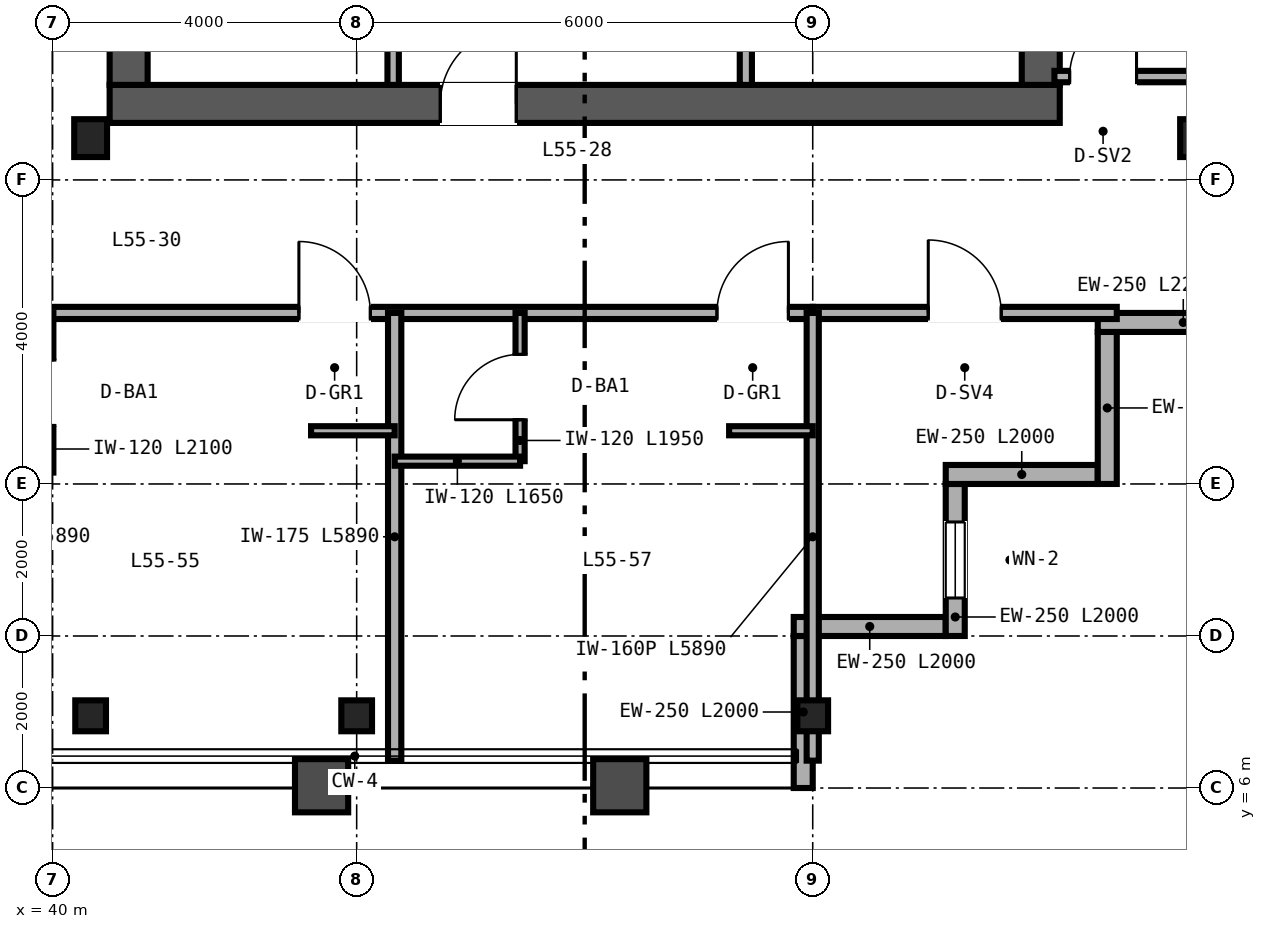
"""IFC4 building model, lengths in metres.
Left out: names, types, materials, properties, quantities, classifications, styles, units other than length and angle.
Written with IfcOpenShell. Run it as: python <this file> out.ifc"""

import sys

from ifc_helpers import new_model, si_unit, direction, frame, frame_2d, origin, origin_2d, place, context, subcontext, project, spatial, rectangle, i_section, extrude, source, transform, mapped, element, fill, save


model = new_model("IFC4")
c1 = context("Model", 3, precision=1e-05, world=origin(), true_north=direction((0.0, 1.0)))
c2 = subcontext(c1, "Body", "Model", "MODEL_VIEW")
j1 = project(units=[si_unit("LENGTHUNIT", "METRE"), si_unit("PLANEANGLEUNIT", "RADIAN")], contexts=[c1])
p1 = place(None, origin())
s1 = spatial("IfcSite", under=j1, at=p1, CompositionType="ELEMENT")
p2 = place(p1, origin())
s2 = spatial("IfcBuilding", under=s1, at=p2, CompositionType="ELEMENT")
p3 = place(p2, frame((0.0, 0.0, 217.2)))
s3 = spatial("IfcBuildingStorey", under=s2, at=p3, CompositionType="ELEMENT", Elevation=217.2)
p4 = place(p3, frame((40.75, 15.0, 0.0), z_axis=(0.0, 0.0, 1.0), x_axis=(1.0, 0.0, 0.0)))
e1 = element("IfcWall", 1, at=p4, inside=s3, PredefinedType="SHEAR", context=c2, shape_type="SweptSolid", body=[
    extrude(rectangle(XDim=12.5, YDim=0.5, at=frame_2d((6.25, 0.0))), origin(), (0.0, 0.0, 1.0), 3.28),
])
p5 = place(p4, frame((4.35, 0.0, 0.0)))
e2 = element("IfcOpeningElement", 2, at=p5, cuts=e1, PredefinedType="OPENING", context=c2, shape_type="SweptSolid", body=[
    extrude(rectangle(XDim=1.0, YDim=2.15, at=frame_2d((0.5, 1.075))), frame((0.0, 0.26, 0.0), z_axis=(0.0, -1.0, 0.0), x_axis=(1.0, 0.0, 0.0)), (0.0, 0.0, 1.0), 0.52),
])
for number, where, z_axis, x_axis in (
    (3, (41.0, 15.25, 0.0), (0.0, 0.0, 1.0), (0.0, 1.0, 0.0)),
    (4, (53.0, 15.25, 0.0), (0.0, 0.0, 1.0), (0.0, 1.0, 0.0)),
):
    element("IfcWall", number, at=place(p3, frame(where, z_axis=z_axis, x_axis=x_axis)), inside=s3, PredefinedType="SHEAR", context=c2, shape_type="SweptSolid", body=[
        extrude(rectangle(XDim=21.5, YDim=0.5, at=frame_2d((10.75, 0.0))), origin(), (0.0, 0.0, 1.0), 3.28),
    ])
m1 = source(origin(), c2, "Body", "SweptSolid", [
    extrude(i_section(OverallWidth=0.432, OverallDepth=0.498, WebThickness=0.056, FlangeThickness=0.089, FilletRadius=0.025, at=origin_2d()), origin(), (0.0, 0.0, 1.0), 3.28),
])
for number, where, z_axis, x_axis in (
    (5, (40.5, 14.55, 0.0), (0.0, 0.0, 1.0), (1.0, 0.0, 0.0)),
    (6, (55.05, 14.55, 0.0), (0.0, 0.0, 1.0), (1.0, 0.0, 0.0)),
):
    element("IfcColumn", number, at=place(p3, frame(where, z_axis=z_axis, x_axis=x_axis)), inside=s3, PredefinedType="COLUMN", context=c2, shape_type="MappedRepresentation", body=[
        mapped(m1, transform((0.0, 0.0, 0.0), scale=1.0)),
    ])
m2 = source(origin(), c2, "Body", "SweptSolid", [
    extrude(i_section(OverallWidth=0.404, OverallDepth=0.407, WebThickness=0.027, FlangeThickness=0.044, FilletRadius=0.025, at=origin_2d()), origin(), (0.0, 0.0, 1.0), 3.28),
])
for number, where, z_axis, x_axis in (
    (7, (40.5, 6.95, 0.0), (0.0, 0.0, 1.0), (1.0, 0.0, 0.0)),
    (8, (44.0, 6.95, 0.0), (0.0, 0.0, 1.0), (1.0, 0.0, 0.0)),
    (9, (50.0, 6.95, 0.0), (0.0, 0.0, 1.0), (1.0, 0.0, 0.0)),
):
    element("IfcColumn", number, at=place(p3, frame(where, z_axis=z_axis, x_axis=x_axis)), inside=s3, PredefinedType="COLUMN", context=c2, shape_type="MappedRepresentation", body=[
        mapped(m2, transform((0.0, 0.0, 0.0), scale=1.0)),
    ])
p6 = place(p3, frame((49.875, 6.0, 0.0), z_axis=(0.0, 0.0, 1.0), x_axis=(0.0, 1.0, 0.0)))
e10 = element("IfcWall", 10, at=p6, inside=s3, PredefinedType="SOLIDWALL", context=c2, shape_type="SweptSolid", body=[
    extrude(rectangle(XDim=2.0, YDim=0.25, at=frame_2d((1.0, 0.0))), origin(), (0.0, 0.0, 1.0), 2.587),
])
p7 = place(p3, frame((49.75, 8.125, 0.0), z_axis=(0.0, 0.0, 1.0), x_axis=(1.0, 0.0, 0.0)))
e11 = element("IfcWall", 11, at=p7, inside=s3, PredefinedType="SOLIDWALL", context=c2, shape_type="SweptSolid", body=[
    extrude(rectangle(XDim=2.0, YDim=0.25, at=frame_2d((1.0, 0.0))), origin(), (0.0, 0.0, 1.0), 3.28),
])
p8 = place(p3, frame((51.875, 8.0, 0.0), z_axis=(0.0, 0.0, 1.0), x_axis=(0.0, 1.0, 0.0)))
e12 = element("IfcWall", 12, at=p8, inside=s3, PredefinedType="SOLIDWALL", context=c2, shape_type="SweptSolid", body=[
    extrude(rectangle(XDim=2.0, YDim=0.25, at=frame_2d((1.0, 0.0))), origin(), (0.0, 0.0, 1.0), 3.28),
])
p9 = place(p8, frame((0.5, 0.0, 0.85)))
e13 = element("IfcOpeningElement", 13, at=p9, cuts=e12, PredefinedType="OPENING", context=c2, shape_type="SweptSolid", body=[
    extrude(rectangle(XDim=1.0, YDim=1.9, at=frame_2d((0.5, 0.95))), frame((0.0, 0.135, 0.0), z_axis=(0.0, -1.0, 0.0), x_axis=(1.0, 0.0, 0.0)), (0.0, 0.0, 1.0), 0.27),
])
for number, where, z_axis, x_axis in (
    (14, (51.75, 10.125, 0.0), (0.0, 0.0, 1.0), (1.0, 0.0, 0.0)),
    (15, (53.875, 10.0, 0.0), (0.0, 0.0, 1.0), (0.0, 1.0, 0.0)),
):
    element("IfcWall", number, at=place(p3, frame(where, z_axis=z_axis, x_axis=x_axis)), inside=s3, PredefinedType="SOLIDWALL", context=c2, shape_type="SweptSolid", body=[
        extrude(rectangle(XDim=2.0, YDim=0.25, at=frame_2d((1.0, 0.0))), origin(), (0.0, 0.0, 1.0), 3.28),
    ])
p10 = place(p3, frame((53.75, 12.125, 0.0), z_axis=(0.0, 0.0, 1.0), x_axis=(1.0, 0.0, 0.0)))
e16 = element("IfcWall", 16, at=p10, inside=s3, PredefinedType="SOLIDWALL", context=c2, shape_type="SweptSolid", body=[
    extrude(rectangle(XDim=2.25, YDim=0.25, at=frame_2d((1.125, 0.0))), origin(), (0.0, 0.0, 1.0), 3.28),
])
p11 = place(p3, frame((49.12, 15.25, 0.0), z_axis=(0.0, 0.0, 1.0), x_axis=(0.0, 1.0, 0.0)))
e17 = element("IfcWall", 17, at=p11, inside=s3, PredefinedType="PARTITIONING", context=c2, shape_type="SweptSolid", body=[
    extrude(rectangle(XDim=16.13, YDim=0.16, at=frame_2d((8.065, 0.0))), origin(), (0.0, 0.0, 1.0), 2.36),
])
p12 = place(p11, frame((3.8, 0.0, 0.0)))
e18 = element("IfcOpeningElement", 18, at=p12, cuts=e17, PredefinedType="OPENING", context=c2, shape_type="SweptSolid", body=[
    extrude(rectangle(XDim=0.92, YDim=2.15, at=frame_2d((0.46, 1.075))), frame((0.0, 0.09, 0.0), z_axis=(0.0, -1.0, 0.0), x_axis=(1.0, 0.0, 0.0)), (0.0, 0.0, 1.0), 0.18),
])
p13 = place(p11, frame((11.8, 0.0, 0.0)))
e19 = element("IfcOpeningElement", 19, at=p13, cuts=e17, PredefinedType="OPENING", context=c2, shape_type="SweptSolid", body=[
    extrude(rectangle(XDim=0.9, YDim=2.15, at=frame_2d((0.45, 1.075))), frame((0.0, 0.09, 0.0), z_axis=(0.0, -1.0, 0.0), x_axis=(1.0, 0.0, 0.0)), (0.0, 0.0, 1.0), 0.18),
])
p14 = place(p3, frame((44.48, 15.25, 0.0), z_axis=(0.0, 0.0, 1.0), x_axis=(0.0, 1.0, 0.0)))
e20 = element("IfcWall", 20, at=p14, inside=s3, PredefinedType="PARTITIONING", context=c2, shape_type="SweptSolid", body=[
    extrude(rectangle(XDim=11.63, YDim=0.15, at=frame_2d((5.815, 0.0))), origin(), (0.0, 0.0, 1.0), 3.28),
])
p15 = place(p14, frame((1.6, 0.0, 0.0)))
e21 = element("IfcOpeningElement", 21, at=p15, cuts=e20, PredefinedType="OPENING", context=c2, shape_type="SweptSolid", body=[
    extrude(rectangle(XDim=0.84, YDim=2.1, at=frame_2d((0.42, 1.05))), frame((0.0, 0.085, 0.0), z_axis=(0.0, -1.0, 0.0), x_axis=(1.0, 0.0, 0.0)), (0.0, 0.0, 1.0), 0.17),
])
p16 = place(p14, frame((5.85, 0.0, 0.0)))
e22 = element("IfcOpeningElement", 22, at=p16, cuts=e20, PredefinedType="OPENING", context=c2, shape_type="SweptSolid", body=[
    extrude(rectangle(XDim=0.84, YDim=2.1, at=frame_2d((0.42, 1.05))), frame((0.0, 0.085, 0.0), z_axis=(0.0, -1.0, 0.0), x_axis=(1.0, 0.0, 0.0)), (0.0, 0.0, 1.0), 0.17),
])
p17 = place(p14, frame((10.05, 0.0, 0.0)))
e23 = element("IfcOpeningElement", 23, at=p17, cuts=e20, PredefinedType="OPENING", context=c2, shape_type="SweptSolid", body=[
    extrude(rectangle(XDim=0.84, YDim=2.1, at=frame_2d((0.42, 1.05))), frame((0.0, 0.085, 0.0), z_axis=(0.0, -1.0, 0.0), x_axis=(1.0, 0.0, 0.0)), (0.0, 0.0, 1.0), 0.17),
])
p18 = place(p3, frame((53.18, 15.36, 0.0), z_axis=(0.0, 0.0, 1.0), x_axis=(1.0, 0.0, 0.0)))
e24 = element("IfcWall", 24, at=p18, inside=s3, PredefinedType="PARTITIONING", context=c2, shape_type="SweptSolid", body=[
    extrude(rectangle(XDim=2.66, YDim=0.15, at=frame_2d((1.33, 0.0))), origin(), (0.0, 0.0, 1.0), 2.501),
])
p19 = place(p18, frame((0.2, 0.0, 0.0)))
e25 = element("IfcOpeningElement", 25, at=p19, cuts=e24, PredefinedType="OPENING", context=c2, shape_type="SweptSolid", body=[
    extrude(rectangle(XDim=0.88, YDim=2.15, at=frame_2d((0.44, 1.075))), frame((0.0, 0.085, 0.0), z_axis=(0.0, -1.0, 0.0), x_axis=(1.0, 0.0, 0.0)), (0.0, 0.0, 1.0), 0.17),
])
p20 = place(p3, frame((50.0, 12.25, 0.0), z_axis=(0.0, 0.0, 1.0), x_axis=(1.0, 0.0, 0.0)))
e26 = element("IfcWall", 26, at=p20, inside=s3, PredefinedType="PARTITIONING", context=c2, shape_type="SweptSolid", body=[
    extrude(rectangle(XDim=4.0, YDim=0.16, at=frame_2d((2.0, 0.0))), origin(), (0.0, 0.0, 1.0), 3.28),
])
p21 = place(p20, frame((1.52, 0.0, 0.0)))
e27 = element("IfcOpeningElement", 27, at=p21, cuts=e26, PredefinedType="OPENING", context=c2, shape_type="SweptSolid", body=[
    extrude(rectangle(XDim=0.96, YDim=2.15, at=frame_2d((0.48, 1.075))), frame((0.0, 0.09, 0.0), z_axis=(0.0, -1.0, 0.0), x_axis=(1.0, 0.0, 0.0)), (0.0, 0.0, 1.0), 0.18),
])
p22 = place(p3, frame((38.0, 12.25, 0.0), z_axis=(0.0, 0.0, 1.0), x_axis=(1.0, 0.0, 0.0)))
e28 = element("IfcWall", 28, at=p22, inside=s3, PredefinedType="PARTITIONING", context=c2, shape_type="SweptSolid", body=[
    extrude(rectangle(XDim=12.0, YDim=0.16, at=frame_2d((6.0, 0.0))), origin(), (0.0, 0.0, 1.0), 2.823),
])
p23 = place(p22, frame((5.24, 0.0, 0.0)))
e29 = element("IfcOpeningElement", 29, at=p23, cuts=e28, PredefinedType="OPENING", context=c2, shape_type="SweptSolid", body=[
    extrude(rectangle(XDim=0.94, YDim=2.15, at=frame_2d((0.47, 1.075))), frame((0.0, 0.09, 0.0), z_axis=(0.0, -1.0, 0.0), x_axis=(1.0, 0.0, 0.0)), (0.0, 0.0, 1.0), 0.18),
])
p24 = place(p22, frame((10.74, 0.0, 0.0)))
e30 = element("IfcOpeningElement", 30, at=p24, cuts=e28, PredefinedType="OPENING", context=c2, shape_type="SweptSolid", body=[
    extrude(rectangle(XDim=0.94, YDim=2.15, at=frame_2d((0.47, 1.075))), frame((0.0, 0.09, 0.0), z_axis=(0.0, -1.0, 0.0), x_axis=(1.0, 0.0, 0.0)), (0.0, 0.0, 1.0), 0.18),
])
p25 = place(p3, frame((50.0, 6.36, 0.0), z_axis=(0.0, 0.0, 1.0), x_axis=(0.0, 1.0, 0.0)))
e31 = element("IfcWall", 31, at=p25, inside=s3, PredefinedType="PARTITIONING", context=c2, shape_type="SweptSolid", body=[
    extrude(rectangle(XDim=5.89, YDim=0.16, at=frame_2d((2.945, 0.0))), origin(), (0.0, 0.0, 1.0), 2.587),
])
p26 = place(p3, frame((44.5, 6.36, 0.0), z_axis=(0.0, 0.0, 1.0), x_axis=(0.0, 1.0, 0.0)))
e32 = element("IfcWall", 32, at=p26, inside=s3, PredefinedType="PARTITIONING", context=c2, shape_type="SweptSolid", body=[
    extrude(rectangle(XDim=5.89, YDim=0.175, at=frame_2d((2.945, 0.0))), origin(), (0.0, 0.0, 1.0), 2.587),
])
p27 = place(p3, frame((39.95, 10.15, 0.0), z_axis=(0.0, 0.0, 1.0), x_axis=(0.0, 1.0, 0.0)))
e33 = element("IfcWall", 33, at=p27, inside=s3, PredefinedType="PARTITIONING", context=c2, shape_type="SweptSolid", body=[
    extrude(rectangle(XDim=2.1, YDim=0.12, at=frame_2d((1.05, 0.0))), origin(), (0.0, 0.0, 1.0), 3.28),
])
p28 = place(p27, frame((0.62, 0.0, 0.0)))
e34 = element("IfcOpeningElement", 34, at=p28, cuts=e33, PredefinedType="OPENING", context=c2, shape_type="SweptSolid", body=[
    extrude(rectangle(XDim=0.86, YDim=2.1, at=frame_2d((0.43, 1.05))), frame((0.0, 0.07, 0.0), z_axis=(0.0, -1.0, 0.0), x_axis=(1.0, 0.0, 0.0)), (0.0, 0.0, 1.0), 0.14),
])
p29 = place(p3, frame((43.4, 10.7, 0.0), z_axis=(0.0, 0.0, 1.0), x_axis=(1.0, 0.0, 0.0)))
e35 = element("IfcWall", 35, at=p29, inside=s3, PredefinedType="PARTITIONING", context=c2, shape_type="SweptSolid", body=[
    extrude(rectangle(XDim=1.1, YDim=0.12, at=frame_2d((0.55, 0.0))), origin(), (0.0, 0.0, 1.0), 3.28),
])
p30 = place(p3, frame((46.15, 10.3, 0.0), z_axis=(0.0, 0.0, 1.0), x_axis=(0.0, 1.0, 0.0)))
e36 = element("IfcWall", 36, at=p30, inside=s3, PredefinedType="PARTITIONING", context=c2, shape_type="SweptSolid", body=[
    extrude(rectangle(XDim=1.95, YDim=0.12, at=frame_2d((0.975, 0.0))), origin(), (0.0, 0.0, 1.0), 3.28),
])
p31 = place(p30, frame((0.545, 0.0, 0.0)))
e37 = element("IfcOpeningElement", 37, at=p31, cuts=e36, PredefinedType="OPENING", context=c2, shape_type="SweptSolid", body=[
    extrude(rectangle(XDim=0.86, YDim=2.1, at=frame_2d((0.43, 1.05))), frame((0.0, 0.07, 0.0), z_axis=(0.0, -1.0, 0.0), x_axis=(1.0, 0.0, 0.0)), (0.0, 0.0, 1.0), 0.14),
])
p32 = place(p3, frame((44.5, 10.3, 0.0), z_axis=(0.0, 0.0, 1.0), x_axis=(1.0, 0.0, 0.0)))
e38 = element("IfcWall", 38, at=p32, inside=s3, PredefinedType="PARTITIONING", context=c2, shape_type="SweptSolid", body=[
    extrude(rectangle(XDim=1.65, YDim=0.12, at=frame_2d((0.825, 0.0))), origin(), (0.0, 0.0, 1.0), 3.28),
])
p33 = place(p3, frame((48.9, 10.7, 0.0), z_axis=(0.0, 0.0, 1.0), x_axis=(1.0, 0.0, 0.0)))
e39 = element("IfcWall", 39, at=p33, inside=s3, PredefinedType="PARTITIONING", context=c2, shape_type="SweptSolid", body=[
    extrude(rectangle(XDim=1.1, YDim=0.12, at=frame_2d((0.55, 0.0))), origin(), (0.0, 0.0, 1.0), 3.28),
])
m3 = source(origin(), c2, "Body", "SweptSolid", [
    extrude(rectangle(XDim=1.0, YDim=1.9, at=frame_2d((0.5, 0.95))), frame((0.0, 0.03, 0.0), z_axis=(0.0, -1.0, 0.0), x_axis=(1.0, 0.0, 0.0)), (0.0, 0.0, 1.0), 0.06),
])
p34 = place(p9, origin())
e40 = element("IfcWindow", 40, at=p34, inside=s3, PartitioningType="SINGLE_PANEL", PredefinedType="WINDOW", context=c2, shape_type="MappedRepresentation", body=[
    mapped(m3, transform((0.0, 0.0, 0.0), scale=1.0)),
])
fill(e13, e40)
m4 = source(origin(), c2, "Body", "SweptSolid", [
    extrude(rectangle(XDim=1.0, YDim=2.15, at=frame_2d((0.5, 1.075))), frame((0.0, 0.025, 0.0), z_axis=(0.0, -1.0, 0.0), x_axis=(1.0, 0.0, 0.0)), (0.0, 0.0, 1.0), 0.05),
])
p35 = place(p5, origin())
e41 = element("IfcDoor", 41, at=p35, inside=s3, OperationType="SINGLE_SWING_RIGHT", PredefinedType="DOOR", context=c2, shape_type="MappedRepresentation", body=[
    mapped(m4, transform((0.0, 0.0, 0.0), scale=1.0)),
])
fill(e2, e41)
m5 = source(origin(), c2, "Body", "SweptSolid", [
    extrude(rectangle(XDim=0.88, YDim=2.15, at=frame_2d((0.44, 1.075))), frame((0.0, 0.025, 0.0), z_axis=(0.0, -1.0, 0.0), x_axis=(1.0, 0.0, 0.0)), (0.0, 0.0, 1.0), 0.05),
])
p36 = place(p19, origin())
e42 = element("IfcDoor", 42, at=p36, inside=s3, OperationType="SINGLE_SWING_RIGHT", PredefinedType="DOOR", context=c2, shape_type="MappedRepresentation", body=[
    mapped(m5, transform((0.0, 0.0, 0.0), scale=1.0)),
])
fill(e25, e42)
m6 = source(origin(), c2, "Body", "SweptSolid", [
    extrude(rectangle(XDim=0.96, YDim=2.15, at=frame_2d((0.48, 1.075))), frame((0.0, 0.025, 0.0), z_axis=(0.0, -1.0, 0.0), x_axis=(1.0, 0.0, 0.0)), (0.0, 0.0, 1.0), 0.05),
])
p37 = place(p21, origin())
e43 = element("IfcDoor", 43, at=p37, inside=s3, OperationType="SINGLE_SWING_LEFT", PredefinedType="DOOR", context=c2, shape_type="MappedRepresentation", body=[
    mapped(m6, transform((0.0, 0.0, 0.0), scale=1.0)),
])
fill(e27, e43)
m7 = source(origin(), c2, "Body", "SweptSolid", [
    extrude(rectangle(XDim=0.86, YDim=2.1, at=frame_2d((0.43, 1.05))), frame((0.0, 0.025, 0.0), z_axis=(0.0, -1.0, 0.0), x_axis=(1.0, 0.0, 0.0)), (0.0, 0.0, 1.0), 0.05),
])
p38 = place(p31, origin())
e44 = element("IfcDoor", 44, at=p38, inside=s3, OperationType="SINGLE_SWING_LEFT", PredefinedType="DOOR", context=c2, shape_type="MappedRepresentation", body=[
    mapped(m7, transform((0.0, 0.0, 0.0), scale=1.0)),
])
fill(e37, e44)
m8 = source(origin(), c2, "Body", "SweptSolid", [
    extrude(rectangle(XDim=0.94, YDim=2.15, at=frame_2d((0.47, 1.075))), frame((0.0, 0.025, 0.0), z_axis=(0.0, -1.0, 0.0), x_axis=(1.0, 0.0, 0.0)), (0.0, 0.0, 1.0), 0.05),
])
p39 = place(p23, origin())
e45 = element("IfcDoor", 45, at=p39, inside=s3, OperationType="SINGLE_SWING_LEFT", PredefinedType="DOOR", context=c2, shape_type="MappedRepresentation", body=[
    mapped(m8, transform((0.0, 0.0, 0.0), scale=1.0)),
])
fill(e29, e45)
p40 = place(p24, origin())
e46 = element("IfcDoor", 46, at=p40, inside=s3, OperationType="SINGLE_SWING_RIGHT", PredefinedType="DOOR", context=c2, shape_type="MappedRepresentation", body=[
    mapped(m8, transform((0.0, 0.0, 0.0), scale=1.0)),
])
fill(e30, e46)
save(model, sys.argv[1])
